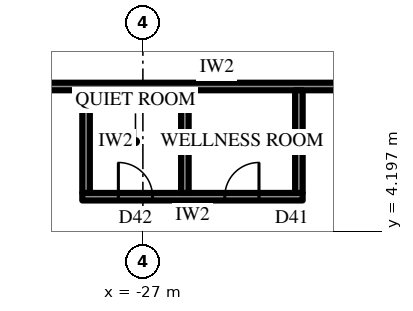
"""IFC4 building model, lengths in metres.
Left out: names, types, materials, properties, quantities, classifications, styles, units other than length and angle.
Written with IfcOpenShell. Run it as: python <this file> out.ifc"""

import sys

from ifc_helpers import new_model, si_unit, direction, frame, frame_2d, origin, place, context, subcontext, project, spatial, rectangle, extrude, element, fill, save


model = new_model("IFC4")
c1 = context("Model", 3, precision=1e-05, world=origin(), true_north=direction((0.0, 1.0)))
c2 = subcontext(c1, "Body", "Model", "MODEL_VIEW")
j1 = project(units=[si_unit("LENGTHUNIT", "METRE"), si_unit("PLANEANGLEUNIT", "RADIAN")], contexts=[c1])
p1 = place(None, origin())
s1 = spatial("IfcSite", under=j1, at=p1, CompositionType="ELEMENT")
p2 = place(p1, origin())
s2 = spatial("IfcBuilding", under=s1, at=p2, CompositionType="ELEMENT")
p3 = place(p2, frame((0.0, 0.0, 140.5)))
s3 = spatial("IfcBuildingStorey", under=s2, at=p3, CompositionType="ELEMENT", Elevation=140.5)
p4 = place(p3, frame((-18.6, 8.0, 0.0), z_axis=(0.0, 0.0, 1.0), x_axis=(-1.0, 0.0, 0.0)))
e1 = element("IfcWall", 1, at=p4, inside=s3, PredefinedType="PARTITIONING", context=c2, shape_type="SweptSolid", body=[
    extrude(rectangle(XDim=12.9, YDim=0.2, at=frame_2d((6.45, 0.0))), origin(), (0.0, 0.0, 1.0), 4.0),
])
p5 = place(p4, frame((0.79, 0.0, 0.0)))
e2 = element("IfcOpeningElement", 2, at=p5, cuts=e1, PredefinedType="OPENING", context=c2, shape_type="SweptSolid", body=[
    extrude(rectangle(XDim=1.0, YDim=2.2, at=frame_2d((0.5, 1.1))), frame((0.0, 0.11, 0.0), z_axis=(0.0, -1.0, 0.0), x_axis=(1.0, 0.0, 0.0)), (0.0, 0.0, 1.0), 0.22),
])
p6 = place(p3, frame((-22.795, 5.1, 0.0), z_axis=(0.0, 0.0, 1.0), x_axis=(-1.0, 0.0, 0.0)))
e3 = element("IfcWall", 3, at=p6, inside=s3, PredefinedType="PARTITIONING", context=c2, shape_type="SweptSolid", body=[
    extrude(rectangle(XDim=5.8, YDim=0.2, at=frame_2d((2.9, 0.0))), origin(), (0.0, 0.0, 1.0), 4.0),
])
p7 = place(p6, frame((1.15, 0.0, 0.0)))
e4 = element("IfcOpeningElement", 4, at=p7, cuts=e3, PredefinedType="OPENING", context=c2, shape_type="SweptSolid", body=[
    extrude(rectangle(XDim=0.9, YDim=2.2, at=frame_2d((0.45, 1.1))), frame((0.0, 0.11, 0.0), z_axis=(0.0, -1.0, 0.0), x_axis=(1.0, 0.0, 0.0)), (0.0, 0.0, 1.0), 0.22),
])
p8 = place(p6, frame((3.95, 0.0, 0.0)))
e5 = element("IfcOpeningElement", 5, at=p8, cuts=e3, PredefinedType="OPENING", context=c2, shape_type="SweptSolid", body=[
    extrude(rectangle(XDim=0.9, YDim=2.2, at=frame_2d((0.45, 1.1))), frame((0.0, 0.11, 0.0), z_axis=(0.0, -1.0, 0.0), x_axis=(1.0, 0.0, 0.0)), (0.0, 0.0, 1.0), 0.22),
])
for number, where, z_axis, x_axis in (
    (6, (-22.895, 7.9, 0.0), (0.0, 0.0, 1.0), (0.0, -1.0, 0.0)),
    (7, (-25.895, 7.9, 0.0), (0.0, 0.0, 1.0), (0.0, -1.0, 0.0)),
    (8, (-28.495, 7.9, 0.0), (0.0, 0.0, 1.0), (0.0, -1.0, 0.0)),
):
    element("IfcWall", number, at=place(p3, frame(where, z_axis=z_axis, x_axis=x_axis)), inside=s3, PredefinedType="PARTITIONING", context=c2, shape_type="SweptSolid", body=[
        extrude(rectangle(XDim=2.7, YDim=0.2, at=frame_2d((1.35, 0.0))), origin(), (0.0, 0.0, 1.0), 4.0),
    ])
p9 = place(p7, frame((0.9, 0.0, 0.0), z_axis=(0.0, 0.0, 1.0), x_axis=(-1.0, 0.0, 0.0)))
e9 = element("IfcDoor", 9, at=p9, inside=s3, OperationType="SINGLE_SWING_LEFT", PredefinedType="DOOR", context=c2, shape_type="SweptSolid", body=[
    extrude(rectangle(XDim=0.9, YDim=2.2, at=frame_2d((0.45, 1.1))), frame((0.0, 0.025, 0.0), z_axis=(0.0, -1.0, 0.0), x_axis=(1.0, 0.0, 0.0)), (0.0, 0.0, 1.0), 0.05),
])
fill(e4, e9)
p10 = place(p8, frame((0.9, 0.0, 0.0), z_axis=(0.0, 0.0, 1.0), x_axis=(-1.0, 0.0, 0.0)))
e10 = element("IfcDoor", 10, at=p10, inside=s3, OperationType="SINGLE_SWING_RIGHT", PredefinedType="DOOR", context=c2, shape_type="SweptSolid", body=[
    extrude(rectangle(XDim=0.9, YDim=2.2, at=frame_2d((0.45, 1.1))), frame((0.0, 0.025, 0.0), z_axis=(0.0, -1.0, 0.0), x_axis=(1.0, 0.0, 0.0)), (0.0, 0.0, 1.0), 0.05),
])
fill(e5, e10)
save(model, sys.argv[1])
